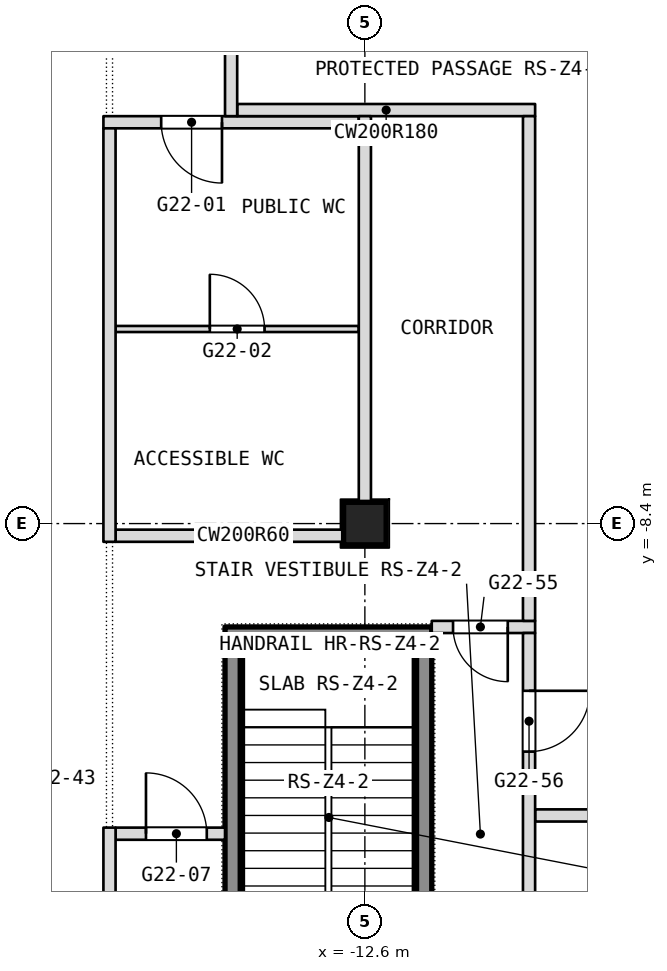
"""IFC4 building model, lengths in metres.
Left out: names, types, materials, properties, quantities, classifications, styles, units other than length and angle.
Written with IfcOpenShell. Run it as: python <this file> out.ifc"""

import sys

from ifc_helpers import new_model, si_unit, direction, frame, frame_2d, origin, origin_2d, place, context, subcontext, project, spatial, rectangle, extrude, element, fill, save


model = new_model("IFC4")
c1 = context("Model", 3, precision=1e-05, world=origin(), true_north=direction((0.0, 1.0)))
c2 = subcontext(c1, "Body", "Model", "MODEL_VIEW")
j1 = project(units=[si_unit("LENGTHUNIT", "METRE"), si_unit("PLANEANGLEUNIT", "RADIAN")], contexts=[c1])
p1 = place(None, origin())
s1 = spatial("IfcSite", under=j1, at=p1, CompositionType="ELEMENT")
p2 = place(p1, origin())
s2 = spatial("IfcBuilding", under=s1, at=p2, CompositionType="ELEMENT")
p3 = place(p2, frame((0.0, 0.0, 266.9)))
s3 = spatial("IfcBuildingStorey", under=s2, at=p3, CompositionType="ELEMENT", Elevation=266.9)
p4 = place(p3, frame((-12.6, -8.4, 0.0), z_axis=(0.0, 0.0, 1.0), x_axis=(1.0, 0.0, 0.0)))
e1 = element("IfcColumn", 1, at=p4, inside=s3, PredefinedType="COLUMN", context=c2, shape_type="SweptSolid", body=[
    extrude(rectangle(XDim=0.7, YDim=0.7, at=origin_2d()), origin(), (0.0, 0.0, 1.0), 3.6),
])
p5 = place(p3, frame((-16.7, -13.5, 0.0), z_axis=(0.0, 0.0, 1.0), x_axis=(1.0, 0.0, 0.0)))
e2 = element("IfcWall", 2, at=p5, inside=s3, PredefinedType="PARTITIONING", context=c2, shape_type="SweptSolid", body=[
    extrude(rectangle(XDim=1.8, YDim=0.2, at=frame_2d((0.9, 0.0))), origin(), (0.0, 0.0, 1.0), 3.34),
])
p6 = place(p5, frame((0.5, 0.0, 0.0)))
e3 = element("IfcOpeningElement", 3, at=p6, cuts=e2, PredefinedType="OPENING", context=c2, shape_type="SweptSolid", body=[
    extrude(rectangle(XDim=1.0, YDim=2.1, at=frame_2d((0.5, 1.05))), frame((0.0, 0.1, 0.0), z_axis=(0.0, -1.0, 0.0), x_axis=(1.0, 0.0, 0.0)), (0.0, 0.0, 1.0), 0.2),
])
p7 = place(p3, frame((-9.8, -13.2, 0.0), z_axis=(0.0, 0.0, 1.0), x_axis=(1.0, 0.0, 0.0)))
e4 = element("IfcWall", 4, at=p7, inside=s3, PredefinedType="PARTITIONING", context=c2, shape_type="SweptSolid", body=[
    extrude(rectangle(XDim=1.4, YDim=0.2, at=frame_2d((0.7, 0.0))), origin(), (0.0, 0.0, 1.0), 3.34),
])
p8 = place(p3, frame((-11.5, -10.1, 0.0), z_axis=(0.0, 0.0, 1.0), x_axis=(1.0, 0.0, 0.0)))
e5 = element("IfcWall", 5, at=p8, inside=s3, PredefinedType="PARTITIONING", context=c2, shape_type="SweptSolid", body=[
    extrude(rectangle(XDim=1.7, YDim=0.2, at=frame_2d((0.85, 0.0))), origin(), (0.0, 0.0, 1.0), 3.34),
])
p9 = place(p8, frame((0.35, 0.0, 0.0)))
e6 = element("IfcOpeningElement", 6, at=p9, cuts=e5, PredefinedType="OPENING", context=c2, shape_type="SweptSolid", body=[
    extrude(rectangle(XDim=0.9, YDim=2.1, at=frame_2d((0.45, 1.05))), frame((0.0, 0.1, 0.0), z_axis=(0.0, -1.0, 0.0), x_axis=(1.0, 0.0, 0.0)), (0.0, 0.0, 1.0), 0.2),
])
p10 = place(p3, frame((-16.7, -8.6, 0.0), z_axis=(0.0, 0.0, 1.0), x_axis=(1.0, 0.0, 0.0)))
e7 = element("IfcWall", 7, at=p10, inside=s3, PredefinedType="PARTITIONING", context=c2, shape_type="SweptSolid", body=[
    extrude(rectangle(XDim=4.2, YDim=0.2, at=frame_2d((2.1, 0.0))), origin(), (0.0, 0.0, 1.0), 3.34),
])
p11 = place(p3, frame((-16.7, -5.2, 0.0), z_axis=(0.0, 0.0, 1.0), x_axis=(1.0, 0.0, 0.0)))
e8 = element("IfcWall", 8, at=p11, inside=s3, PredefinedType="PARTITIONING", context=c2, shape_type="SweptSolid", body=[
    extrude(rectangle(XDim=4.0, YDim=0.1, at=frame_2d((2.0, 0.0))), origin(), (0.0, 0.0, 1.0), 3.34),
])
p12 = place(p11, frame((1.55, 0.0, 0.0)))
e9 = element("IfcOpeningElement", 9, at=p12, cuts=e8, PredefinedType="OPENING", context=c2, shape_type="SweptSolid", body=[
    extrude(rectangle(XDim=0.9, YDim=2.1, at=frame_2d((0.45, 1.05))), frame((0.0, 0.05, 0.0), z_axis=(0.0, -1.0, 0.0), x_axis=(1.0, 0.0, 0.0)), (0.0, 0.0, 1.0), 0.1),
])
p13 = place(p3, frame((-16.9, -1.8, 0.0), z_axis=(0.0, 0.0, 1.0), x_axis=(1.0, 0.0, 0.0)))
e10 = element("IfcWall", 10, at=p13, inside=s3, PredefinedType="PARTITIONING", context=c2, shape_type="SweptSolid", body=[
    extrude(rectangle(XDim=4.2, YDim=0.2, at=frame_2d((2.1, 0.0))), origin(), (0.0, 0.0, 1.0), 3.34),
])
p14 = place(p13, frame((0.95, 0.0, 0.0)))
e11 = element("IfcOpeningElement", 11, at=p14, cuts=e10, PredefinedType="OPENING", context=c2, shape_type="SweptSolid", body=[
    extrude(rectangle(XDim=1.0, YDim=2.1, at=frame_2d((0.5, 1.05))), frame((0.0, 0.1, 0.0), z_axis=(0.0, -1.0, 0.0), x_axis=(1.0, 0.0, 0.0)), (0.0, 0.0, 1.0), 0.2),
])
p15 = place(p3, frame((-14.7, -1.6, 0.0), z_axis=(0.0, 0.0, 1.0), x_axis=(1.0, 0.0, 0.0)))
e12 = element("IfcWall", 12, at=p15, inside=s3, PredefinedType="PARTITIONING", context=c2, shape_type="SweptSolid", body=[
    extrude(rectangle(XDim=4.9, YDim=0.2, at=frame_2d((2.45, 0.0))), origin(), (0.0, 0.0, 1.0), 3.34),
])
p16 = place(p3, frame((-9.9, -16.4, 0.0), z_axis=(0.0, 0.0, 1.0), x_axis=(0.0, 1.0, 0.0)))
e13 = element("IfcWall", 13, at=p16, inside=s3, PredefinedType="PARTITIONING", context=c2, shape_type="SweptSolid", body=[
    extrude(rectangle(XDim=6.2, YDim=0.2, at=frame_2d((3.1, 0.0))), origin(), (0.0, 0.0, 1.0), 3.34),
])
p17 = place(p16, frame((4.25, 0.0, 0.0)))
e14 = element("IfcOpeningElement", 14, at=p17, cuts=e13, PredefinedType="OPENING", context=c2, shape_type="SweptSolid", body=[
    extrude(rectangle(XDim=1.0, YDim=2.1, at=frame_2d((0.5, 1.05))), frame((0.0, 0.1, 0.0), z_axis=(0.0, -1.0, 0.0), x_axis=(1.0, 0.0, 0.0)), (0.0, 0.0, 1.0), 0.2),
])
p18 = place(p3, frame((-9.9, -10.0, 0.0), z_axis=(0.0, 0.0, 1.0), x_axis=(0.0, 1.0, 0.0)))
e15 = element("IfcWall", 15, at=p18, inside=s3, PredefinedType="PARTITIONING", context=c2, shape_type="SweptSolid", body=[
    extrude(rectangle(XDim=8.3, YDim=0.2, at=frame_2d((4.15, 0.0))), origin(), (0.0, 0.0, 1.0), 3.34),
])
p19 = place(p3, frame((-12.6, -8.5, 0.0), z_axis=(0.0, 0.0, 1.0), x_axis=(0.0, 1.0, 0.0)))
e16 = element("IfcWall", 16, at=p19, inside=s3, PredefinedType="PARTITIONING", context=c2, shape_type="SweptSolid", body=[
    extrude(rectangle(XDim=6.8, YDim=0.2, at=frame_2d((3.4, 0.0))), origin(), (0.0, 0.0, 1.0), 3.34),
])
p20 = place(p3, frame((-14.8, -1.7, 0.0), z_axis=(0.0, 0.0, 1.0), x_axis=(0.0, 1.0, 0.0)))
e17 = element("IfcWall", 17, at=p20, inside=s3, PredefinedType="PARTITIONING", context=c2, shape_type="SweptSolid", body=[
    extrude(rectangle(XDim=1.6, YDim=0.2, at=frame_2d((0.8, 0.0))), origin(), (0.0, 0.0, 1.0), 3.34),
])
for number, where, z_axis, x_axis in (
    (18, (-16.8, -20.2, 0.0), (0.0, 0.0, 1.0), (0.0, 1.0, 0.0)),
    (19, (-16.8, -8.7, 0.0), (0.0, 0.0, 1.0), (0.0, 1.0, 0.0)),
):
    element("IfcWall", number, at=place(p3, frame(where, z_axis=z_axis, x_axis=x_axis)), inside=s3, PredefinedType="PARTITIONING", context=c2, shape_type="SweptSolid", body=[
        extrude(rectangle(XDim=6.8, YDim=0.2, at=frame_2d((3.4, 0.0))), origin(), (0.0, 0.0, 1.0), 3.34),
    ])
p21 = place(p3, frame((-14.9, -10.225, -0.26), z_axis=(0.0, 0.0, 1.0), x_axis=(1.0, 0.0, 0.0)))
e20 = element("IfcWall", 20, at=p21, inside=s3, PredefinedType="SHEAR", context=c2, shape_type="SweptSolid", body=[
    extrude(rectangle(XDim=3.4, YDim=0.25, at=frame_2d((1.7, 0.0))), origin(), (0.0, 0.0, 1.0), 3.96),
])
p22 = place(p3, frame((-14.775, -16.05, -0.26), z_axis=(0.0, 0.0, 1.0), x_axis=(0.0, 1.0, 0.0)))
e21 = element("IfcWall", 21, at=p22, inside=s3, PredefinedType="SHEAR", context=c2, shape_type="SweptSolid", body=[
    extrude(rectangle(XDim=5.7, YDim=0.25, at=frame_2d((2.85, 0.0))), origin(), (0.0, 0.0, 1.0), 3.96),
])
p23 = place(p3, frame((-11.625, -16.05, -0.26), z_axis=(0.0, 0.0, 1.0), x_axis=(0.0, 1.0, 0.0)))
e22 = element("IfcWall", 22, at=p23, inside=s3, PredefinedType="SHEAR", context=c2, shape_type="SweptSolid", body=[
    extrude(rectangle(XDim=5.7, YDim=0.25, at=frame_2d((2.85, 0.0))), origin(), (0.0, 0.0, 1.0), 3.96),
])
p24 = place(p23, frame((0.2, 0.0, 0.0)))
e23 = element("IfcOpeningElement", 23, at=p24, cuts=e22, PredefinedType="OPENING", context=c2, shape_type="SweptSolid", body=[
    extrude(rectangle(XDim=1.0, YDim=2.1, at=frame_2d((0.5, 1.05))), frame((0.0, 0.125, 0.0), z_axis=(0.0, -1.0, 0.0), x_axis=(1.0, 0.0, 0.0)), (0.0, 0.0, 1.0), 0.25),
])
p25 = place(p6, origin())
e24 = element("IfcDoor", 24, at=p25, inside=s3, OperationType="SINGLE_SWING_RIGHT", PredefinedType="DOOR", context=c2, shape_type="SweptSolid", body=[
    extrude(rectangle(XDim=1.0, YDim=2.1, at=frame_2d((0.5, 1.05))), frame((0.0, 0.025, 0.0), z_axis=(0.0, -1.0, 0.0), x_axis=(1.0, 0.0, 0.0)), (0.0, 0.0, 1.0), 0.05),
])
fill(e3, e24)
p26 = place(p9, origin())
e25 = element("IfcDoor", 25, at=p26, inside=s3, OperationType="SINGLE_SWING_LEFT", PredefinedType="DOOR", context=c2, shape_type="SweptSolid", body=[
    extrude(rectangle(XDim=0.9, YDim=2.1, at=frame_2d((0.45, 1.05))), frame((0.0, 0.025, 0.0), z_axis=(0.0, -1.0, 0.0), x_axis=(1.0, 0.0, 0.0)), (0.0, 0.0, 1.0), 0.05),
])
fill(e6, e25)
p27 = place(p12, origin())
e26 = element("IfcDoor", 26, at=p27, inside=s3, OperationType="SINGLE_SWING_RIGHT", PredefinedType="DOOR", context=c2, shape_type="SweptSolid", body=[
    extrude(rectangle(XDim=0.9, YDim=2.1, at=frame_2d((0.45, 1.05))), frame((0.0, 0.025, 0.0), z_axis=(0.0, -1.0, 0.0), x_axis=(1.0, 0.0, 0.0)), (0.0, 0.0, 1.0), 0.05),
])
fill(e9, e26)
p28 = place(p14, origin())
e27 = element("IfcDoor", 27, at=p28, inside=s3, OperationType="SINGLE_SWING_LEFT", PredefinedType="DOOR", context=c2, shape_type="SweptSolid", body=[
    extrude(rectangle(XDim=1.0, YDim=2.1, at=frame_2d((0.5, 1.05))), frame((0.0, 0.025, 0.0), z_axis=(0.0, -1.0, 0.0), x_axis=(1.0, 0.0, 0.0)), (0.0, 0.0, 1.0), 0.05),
])
fill(e11, e27)
p29 = place(p17, origin())
e28 = element("IfcDoor", 28, at=p29, inside=s3, OperationType="SINGLE_SWING_RIGHT", PredefinedType="DOOR", context=c2, shape_type="SweptSolid", body=[
    extrude(rectangle(XDim=1.0, YDim=2.1, at=frame_2d((0.5, 1.05))), frame((0.0, 0.025, 0.0), z_axis=(0.0, -1.0, 0.0), x_axis=(1.0, 0.0, 0.0)), (0.0, 0.0, 1.0), 0.05),
])
fill(e14, e28)
save(model, sys.argv[1])
